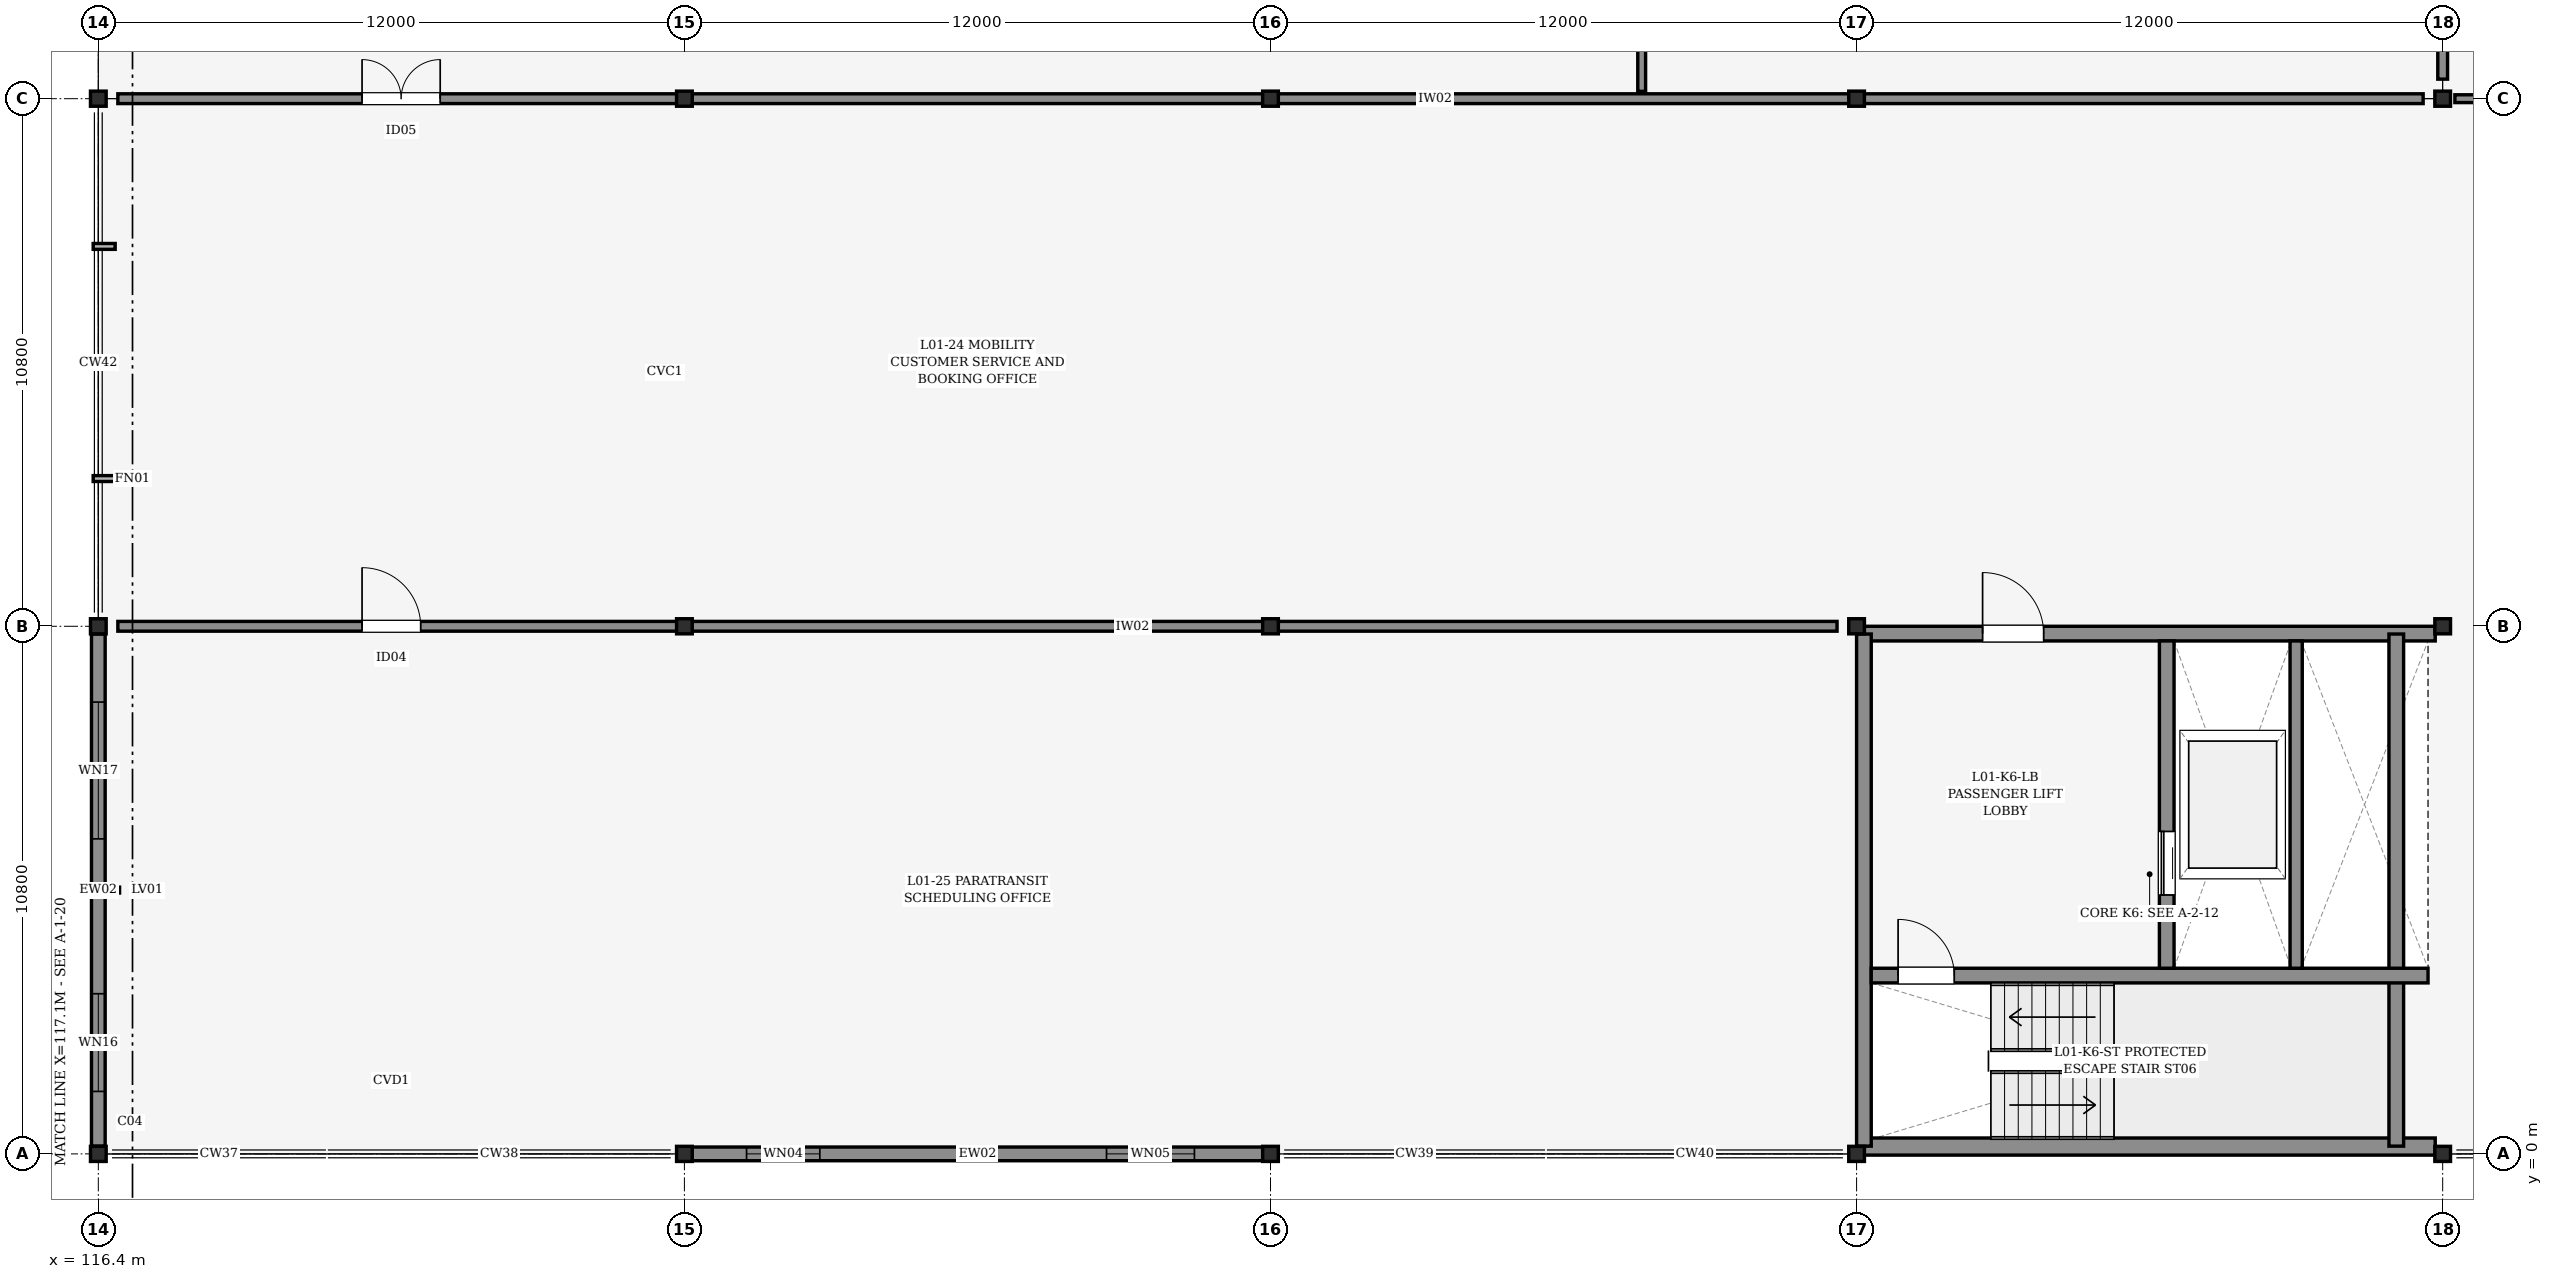
"""IFC4 building model, lengths in metres.
Left out: names, types, materials, properties, quantities, classifications, styles, units other than length and angle.
Written with IfcOpenShell. Run it as: python <this file> out.ifc"""

import sys

from ifc_helpers import new_model, si_unit, direction, frame, frame_2d, origin, origin_2d, place, context, subcontext, project, spatial, rectangle, i_section, extrude, element, fill, save


model = new_model("IFC4")
c1 = context("Model", 3, precision=1e-05, world=origin(), true_north=direction((0.0, 1.0)))
c2 = subcontext(c1, "Body", "Model", "MODEL_VIEW")
j1 = project(units=[si_unit("LENGTHUNIT", "METRE"), si_unit("PLANEANGLEUNIT", "RADIAN")], contexts=[c1])
p1 = place(None, origin())
s1 = spatial("IfcSite", under=j1, at=p1, CompositionType="ELEMENT")
p2 = place(p1, origin())
s2 = spatial("IfcBuilding", under=s1, at=p2, CompositionType="ELEMENT")
p3 = place(p2, frame((0.0, 0.0, 5.4)))
s3 = spatial("IfcBuildingStorey", under=s2, at=p3, CompositionType="ELEMENT", Elevation=5.4)
for number, where, z_axis, x_axis in (
    (1, (116.4, 0.0, 0.0), (0.0, 0.0, 1.0), (1.0, 0.0, 0.0)),
    (2, (116.4, 10.8, 0.0), (0.0, 0.0, 1.0), (1.0, 0.0, 0.0)),
    (3, (116.4, 21.6, 0.0), (0.0, 0.0, 1.0), (1.0, 0.0, 0.0)),
    (4, (128.4, 0.0, 0.0), (0.0, 0.0, 1.0), (1.0, 0.0, 0.0)),
    (5, (128.4, 10.8, 0.0), (0.0, 0.0, 1.0), (1.0, 0.0, 0.0)),
    (6, (128.4, 21.6, 0.0), (0.0, 0.0, 1.0), (1.0, 0.0, 0.0)),
    (7, (140.4, 0.0, 0.0), (0.0, 0.0, 1.0), (1.0, 0.0, 0.0)),
    (8, (140.4, 10.8, 0.0), (0.0, 0.0, 1.0), (1.0, 0.0, 0.0)),
    (9, (140.4, 21.6, 0.0), (0.0, 0.0, 1.0), (1.0, 0.0, 0.0)),
    (10, (152.4, 0.0, 0.0), (0.0, 0.0, 1.0), (1.0, 0.0, 0.0)),
    (11, (152.4, 10.8, 0.0), (0.0, 0.0, 1.0), (1.0, 0.0, 0.0)),
    (12, (152.4, 21.6, 0.0), (0.0, 0.0, 1.0), (1.0, 0.0, 0.0)),
    (13, (164.4, 0.0, 0.0), (0.0, 0.0, 1.0), (1.0, 0.0, 0.0)),
    (14, (164.4, 10.8, 0.0), (0.0, 0.0, 1.0), (1.0, 0.0, 0.0)),
    (15, (164.4, 21.6, 0.0), (0.0, 0.0, 1.0), (1.0, 0.0, 0.0)),
):
    element("IfcColumn", number, at=place(p3, frame(where, z_axis=z_axis, x_axis=x_axis)), inside=s3, PredefinedType="COLUMN", context=c2, shape_type="SweptSolid", body=[
        extrude(i_section(OverallWidth=0.309, OverallDepth=0.321, WebThickness=0.014, FlangeThickness=0.022, FilletRadius=0.015, at=origin_2d()), origin(), (0.0, 0.0, 1.0), 3.6),
    ])
p4 = place(p3, frame((128.552, 0.0, 0.0), z_axis=(0.0, 0.0, 1.0), x_axis=(1.0, 0.0, 0.0)))
e16 = element("IfcWall", 16, at=p4, inside=s3, PredefinedType="STANDARD", context=c2, shape_type="SweptSolid", body=[
    extrude(rectangle(XDim=11.695, YDim=0.28, at=frame_2d((5.848, 0.0))), origin(), (0.0, 0.0, 1.0), 2.535),
])
p5 = place(p4, frame((1.12, 0.0, 0.595)))
e17 = element("IfcOpeningElement", 17, at=p5, cuts=e16, PredefinedType="OPENING", context=c2, shape_type="SweptSolid", body=[
    extrude(rectangle(XDim=1.5, YDim=1.8, at=frame_2d((0.75, 0.9))), frame((0.0, 0.15, 0.0), z_axis=(0.0, -1.0, 0.0), x_axis=(1.0, 0.0, 0.0)), (0.0, 0.0, 1.0), 0.3),
])
p6 = place(p4, frame((8.49, 0.0, 0.595)))
e18 = element("IfcOpeningElement", 18, at=p6, cuts=e16, PredefinedType="OPENING", context=c2, shape_type="SweptSolid", body=[
    extrude(rectangle(XDim=1.8, YDim=1.8, at=frame_2d((0.9, 0.9))), frame((0.0, 0.15, 0.0), z_axis=(0.0, -1.0, 0.0), x_axis=(1.0, 0.0, 0.0)), (0.0, 0.0, 1.0), 0.3),
])
p7 = place(p3, frame((116.4, 0.158, 0.0), z_axis=(0.0, 0.0, 1.0), x_axis=(0.0, 1.0, 0.0)))
e19 = element("IfcWall", 19, at=p7, inside=s3, PredefinedType="STANDARD", context=c2, shape_type="SweptSolid", body=[
    extrude(rectangle(XDim=10.483, YDim=0.28, at=frame_2d((5.242, 0.0))), origin(), (0.0, 0.0, 1.0), 2.535),
])
p8 = place(p7, frame((1.12, 0.0, 0.65)))
e20 = element("IfcOpeningElement", 20, at=p8, cuts=e19, PredefinedType="OPENING", context=c2, shape_type="SweptSolid", body=[
    extrude(rectangle(XDim=2.0, YDim=1.4, at=frame_2d((1.0, 0.7))), frame((0.0, 0.15, 0.0), z_axis=(0.0, -1.0, 0.0), x_axis=(1.0, 0.0, 0.0)), (0.0, 0.0, 1.0), 0.3),
])
p9 = place(p7, frame((6.29, 0.0, 0.395)))
e21 = element("IfcOpeningElement", 21, at=p9, cuts=e19, PredefinedType="OPENING", context=c2, shape_type="SweptSolid", body=[
    extrude(rectangle(XDim=2.8, YDim=2.0, at=frame_2d((1.4, 1.0))), frame((0.0, 0.15, 0.0), z_axis=(0.0, -1.0, 0.0), x_axis=(1.0, 0.0, 0.0)), (0.0, 0.0, 1.0), 0.3),
])
p10 = place(p3, frame((152.552, 0.15, 0.0), z_axis=(0.0, 0.0, 1.0), x_axis=(1.0, 0.0, 0.0)))
e22 = element("IfcWall", 22, at=p10, inside=s3, PredefinedType="SHEAR", context=c2, shape_type="SweptSolid", body=[
    extrude(rectangle(XDim=11.695, YDim=0.35, at=frame_2d((5.848, 0.0))), origin(), (0.0, 0.0, 1.0), 3.38),
])
p11 = place(p3, frame((152.552, 10.65, 0.0), z_axis=(0.0, 0.0, 1.0), x_axis=(1.0, 0.0, 0.0)))
e23 = element("IfcWall", 23, at=p11, inside=s3, PredefinedType="SHEAR", context=c2, shape_type="SweptSolid", body=[
    extrude(rectangle(XDim=11.695, YDim=0.3, at=frame_2d((5.848, 0.0))), origin(), (0.0, 0.0, 1.0), 3.38),
])
p12 = place(p11, frame((2.427, 0.0, 0.0)))
e24 = element("IfcOpeningElement", 24, at=p12, cuts=e23, PredefinedType="OPENING", context=c2, shape_type="SweptSolid", body=[
    extrude(rectangle(XDim=1.25, YDim=2.15, at=frame_2d((0.625, 1.075))), frame((0.0, 0.16, 0.0), z_axis=(0.0, -1.0, 0.0), x_axis=(1.0, 0.0, 0.0)), (0.0, 0.0, 1.0), 0.32),
])
for number, where, z_axis, x_axis in (
    (25, (152.55, 0.158, 0.0), (0.0, 0.0, 1.0), (0.0, 1.0, 0.0)),
    (26, (163.45, 0.158, 0.0), (0.0, 0.0, 1.0), (0.0, 1.0, 0.0)),
):
    element("IfcWall", number, at=place(p3, frame(where, z_axis=z_axis, x_axis=x_axis)), inside=s3, PredefinedType="SHEAR", context=c2, shape_type="SweptSolid", body=[
        extrude(rectangle(XDim=10.483, YDim=0.3, at=frame_2d((5.242, 0.0))), origin(), (0.0, 0.0, 1.0), 3.38),
    ])
p13 = place(p3, frame((152.7, 3.65, 0.0), z_axis=(0.0, 0.0, 1.0), x_axis=(1.0, 0.0, 0.0)))
e27 = element("IfcWall", 27, at=p13, inside=s3, PredefinedType="SHEAR", context=c2, shape_type="SweptSolid", body=[
    extrude(rectangle(XDim=11.4, YDim=0.3, at=frame_2d((5.7, 0.0))), origin(), (0.0, 0.0, 1.0), 3.38),
])
p14 = place(p13, frame((0.55, 0.0, 0.0)))
e28 = element("IfcOpeningElement", 28, at=p14, cuts=e27, PredefinedType="OPENING", context=c2, shape_type="SweptSolid", body=[
    extrude(rectangle(XDim=1.15, YDim=2.15, at=frame_2d((0.575, 1.075))), frame((0.0, 0.16, 0.0), z_axis=(0.0, -1.0, 0.0), x_axis=(1.0, 0.0, 0.0)), (0.0, 0.0, 1.0), 0.32),
])
p15 = place(p3, frame((158.75, 3.8, 0.0), z_axis=(0.0, 0.0, 1.0), x_axis=(0.0, 1.0, 0.0)))
e29 = element("IfcWall", 29, at=p15, inside=s3, PredefinedType="SHEAR", context=c2, shape_type="SweptSolid", body=[
    extrude(rectangle(XDim=6.7, YDim=0.3, at=frame_2d((3.35, 0.0))), origin(), (0.0, 0.0, 1.0), 3.38),
])
p16 = place(p15, frame((1.5, 0.0, 0.0)))
e30 = element("IfcOpeningElement", 30, at=p16, cuts=e29, PredefinedType="OPENING", context=c2, shape_type="SweptSolid", body=[
    extrude(rectangle(XDim=1.3, YDim=2.3, at=frame_2d((0.65, 1.15))), frame((0.0, 0.16, 0.0), z_axis=(0.0, -1.0, 0.0), x_axis=(1.0, 0.0, 0.0)), (0.0, 0.0, 1.0), 0.32),
])
p17 = place(p3, frame((161.4, 3.8, 0.0), z_axis=(0.0, 0.0, 1.0), x_axis=(0.0, 1.0, 0.0)))
e31 = element("IfcWall", 31, at=p17, inside=s3, PredefinedType="PARTITIONING", context=c2, shape_type="SweptSolid", body=[
    extrude(rectangle(XDim=6.7, YDim=0.25, at=frame_2d((3.35, 0.0))), origin(), (0.0, 0.0, 1.0), 2.525),
])
p18 = place(p3, frame((164.65, 21.6, 0.0), z_axis=(0.0, 0.0, 1.0), x_axis=(1.0, 0.0, 0.0)))
e32 = element("IfcWall", 32, at=p18, inside=s3, PredefinedType="PARTITIONING", context=c2, shape_type="SweptSolid", body=[
    extrude(rectangle(XDim=11.5, YDim=0.16, at=frame_2d((5.75, 0.0))), origin(), (0.0, 0.0, 1.0), 2.525),
])
p19 = place(p3, frame((116.8, 10.8, 0.0), z_axis=(0.0, 0.0, 1.0), x_axis=(1.0, 0.0, 0.0)))
e33 = element("IfcWall", 33, at=p19, inside=s3, PredefinedType="PARTITIONING", context=c2, shape_type="SweptSolid", body=[
    extrude(rectangle(XDim=35.2, YDim=0.2, at=frame_2d((17.6, 0.0))), origin(), (0.0, 0.0, 1.0), 2.525),
])
p20 = place(p19, frame((5.0, 0.0, 0.0)))
e34 = element("IfcOpeningElement", 34, at=p20, cuts=e33, PredefinedType="OPENING", context=c2, shape_type="SweptSolid", body=[
    extrude(rectangle(XDim=1.2, YDim=2.15, at=frame_2d((0.6, 1.075))), frame((0.0, 0.11, 0.0), z_axis=(0.0, -1.0, 0.0), x_axis=(1.0, 0.0, 0.0)), (0.0, 0.0, 1.0), 0.22),
])
p21 = place(p3, frame((116.8, 21.6, 0.0), z_axis=(0.0, 0.0, 1.0), x_axis=(1.0, 0.0, 0.0)))
e35 = element("IfcWall", 35, at=p21, inside=s3, PredefinedType="PARTITIONING", context=c2, shape_type="SweptSolid", body=[
    extrude(rectangle(XDim=47.2, YDim=0.2, at=frame_2d((23.6, 0.0))), origin(), (0.0, 0.0, 1.0), 2.525),
])
p22 = place(p21, frame((5.0, 0.0, 0.0)))
e36 = element("IfcOpeningElement", 36, at=p22, cuts=e35, PredefinedType="OPENING", context=c2, shape_type="SweptSolid", body=[
    extrude(rectangle(XDim=1.6, YDim=2.25, at=frame_2d((0.8, 1.125))), frame((0.0, 0.11, 0.0), z_axis=(0.0, -1.0, 0.0), x_axis=(1.0, 0.0, 0.0)), (0.0, 0.0, 1.0), 0.22),
])
p23 = place(p3, frame((148.0, 21.75, 0.0), z_axis=(0.0, 0.0, 1.0), x_axis=(0.0, 1.0, 0.0)))
e37 = element("IfcWall", 37, at=p23, inside=s3, PredefinedType="PARTITIONING", context=c2, shape_type="SweptSolid", body=[
    extrude(rectangle(XDim=24.9, YDim=0.16, at=frame_2d((12.45, 0.0))), origin(), (0.0, 0.0, 1.0), 2.525),
])
p24 = place(p23, frame((6.0, 0.0, 0.0)))
e38 = element("IfcOpeningElement", 38, at=p24, cuts=e37, PredefinedType="OPENING", context=c2, shape_type="SweptSolid", body=[
    extrude(rectangle(XDim=0.95, YDim=2.1, at=frame_2d((0.475, 1.05))), frame((0.0, 0.09, 0.0), z_axis=(0.0, -1.0, 0.0), x_axis=(1.0, 0.0, 0.0)), (0.0, 0.0, 1.0), 0.18),
])
p25 = place(p3, frame((164.4, 22.0, 0.0), z_axis=(0.0, 0.0, 1.0), x_axis=(0.0, 1.0, 0.0)))
e39 = element("IfcWall", 39, at=p25, inside=s3, PredefinedType="PARTITIONING", context=c2, shape_type="SweptSolid", body=[
    extrude(rectangle(XDim=24.4, YDim=0.2, at=frame_2d((12.2, 0.0))), origin(), (0.0, 0.0, 1.0), 2.525),
])
p26 = place(p25, frame((6.0, 0.0, 0.0)))
e40 = element("IfcOpeningElement", 40, at=p26, cuts=e39, PredefinedType="OPENING", context=c2, shape_type="SweptSolid", body=[
    extrude(rectangle(XDim=1.6, YDim=2.25, at=frame_2d((0.8, 1.125))), frame((0.0, 0.11, 0.0), z_axis=(0.0, -1.0, 0.0), x_axis=(1.0, 0.0, 0.0)), (0.0, 0.0, 1.0), 0.22),
])
p27 = place(p5, origin())
e41 = element("IfcWindow", 41, at=p27, inside=s3, PartitioningType="SINGLE_PANEL", PredefinedType="WINDOW", context=c2, shape_type="SweptSolid", body=[
    extrude(rectangle(XDim=1.5, YDim=1.8, at=frame_2d((0.75, 0.9))), frame((0.0, 0.03, 0.0), z_axis=(0.0, -1.0, 0.0), x_axis=(1.0, 0.0, 0.0)), (0.0, 0.0, 1.0), 0.06),
])
fill(e17, e41)
p28 = place(p6, origin())
e42 = element("IfcWindow", 42, at=p28, inside=s3, PartitioningType="SINGLE_PANEL", PredefinedType="WINDOW", context=c2, shape_type="SweptSolid", body=[
    extrude(rectangle(XDim=1.8, YDim=1.8, at=frame_2d((0.9, 0.9))), frame((0.0, 0.03, 0.0), z_axis=(0.0, -1.0, 0.0), x_axis=(1.0, 0.0, 0.0)), (0.0, 0.0, 1.0), 0.06),
])
fill(e18, e42)
p29 = place(p8, origin())
e43 = element("IfcWindow", 43, at=p29, inside=s3, PartitioningType="SINGLE_PANEL", PredefinedType="WINDOW", context=c2, shape_type="SweptSolid", body=[
    extrude(rectangle(XDim=2.0, YDim=1.4, at=frame_2d((1.0, 0.7))), frame((0.0, 0.03, 0.0), z_axis=(0.0, -1.0, 0.0), x_axis=(1.0, 0.0, 0.0)), (0.0, 0.0, 1.0), 0.06),
])
fill(e20, e43)
p30 = place(p9, origin())
e44 = element("IfcWindow", 44, at=p30, inside=s3, PartitioningType="SINGLE_PANEL", PredefinedType="WINDOW", context=c2, shape_type="SweptSolid", body=[
    extrude(rectangle(XDim=2.8, YDim=2.0, at=frame_2d((1.4, 1.0))), frame((0.0, 0.03, 0.0), z_axis=(0.0, -1.0, 0.0), x_axis=(1.0, 0.0, 0.0)), (0.0, 0.0, 1.0), 0.06),
])
fill(e21, e44)
p31 = place(p12, origin())
e45 = element("IfcDoor", 45, at=p31, inside=s3, OperationType="SINGLE_SWING_LEFT", PredefinedType="DOOR", context=c2, shape_type="SweptSolid", body=[
    extrude(rectangle(XDim=1.25, YDim=2.15, at=frame_2d((0.625, 1.075))), frame((0.0, 0.025, 0.0), z_axis=(0.0, -1.0, 0.0), x_axis=(1.0, 0.0, 0.0)), (0.0, 0.0, 1.0), 0.05),
])
fill(e24, e45)
p32 = place(p14, origin())
e46 = element("IfcDoor", 46, at=p32, inside=s3, OperationType="SINGLE_SWING_LEFT", PredefinedType="DOOR", context=c2, shape_type="SweptSolid", body=[
    extrude(rectangle(XDim=1.15, YDim=2.15, at=frame_2d((0.575, 1.075))), frame((0.0, 0.025, 0.0), z_axis=(0.0, -1.0, 0.0), x_axis=(1.0, 0.0, 0.0)), (0.0, 0.0, 1.0), 0.05),
])
fill(e28, e46)
p33 = place(p16, origin())
e47 = element("IfcDoor", 47, at=p33, inside=s3, OperationType="SLIDING_TO_LEFT", PredefinedType="DOOR", context=c2, shape_type="SweptSolid", body=[
    extrude(rectangle(XDim=1.3, YDim=2.3, at=frame_2d((0.65, 1.15))), frame((0.0, 0.025, 0.0), z_axis=(0.0, -1.0, 0.0), x_axis=(1.0, 0.0, 0.0)), (0.0, 0.0, 1.0), 0.05),
])
fill(e30, e47)
p34 = place(p20, origin())
e48 = element("IfcDoor", 48, at=p34, inside=s3, OperationType="SINGLE_SWING_LEFT", PredefinedType="DOOR", context=c2, shape_type="SweptSolid", body=[
    extrude(rectangle(XDim=1.2, YDim=2.15, at=frame_2d((0.6, 1.075))), frame((0.0, 0.025, 0.0), z_axis=(0.0, -1.0, 0.0), x_axis=(1.0, 0.0, 0.0)), (0.0, 0.0, 1.0), 0.05),
])
fill(e34, e48)
p35 = place(p22, origin())
e49 = element("IfcDoor", 49, at=p35, inside=s3, OperationType="DOUBLE_DOOR_SINGLE_SWING", PredefinedType="DOOR", context=c2, shape_type="SweptSolid", body=[
    extrude(rectangle(XDim=1.6, YDim=2.25, at=frame_2d((0.8, 1.125))), frame((0.0, 0.025, 0.0), z_axis=(0.0, -1.0, 0.0), x_axis=(1.0, 0.0, 0.0)), (0.0, 0.0, 1.0), 0.05),
])
fill(e36, e49)
save(model, sys.argv[1])
